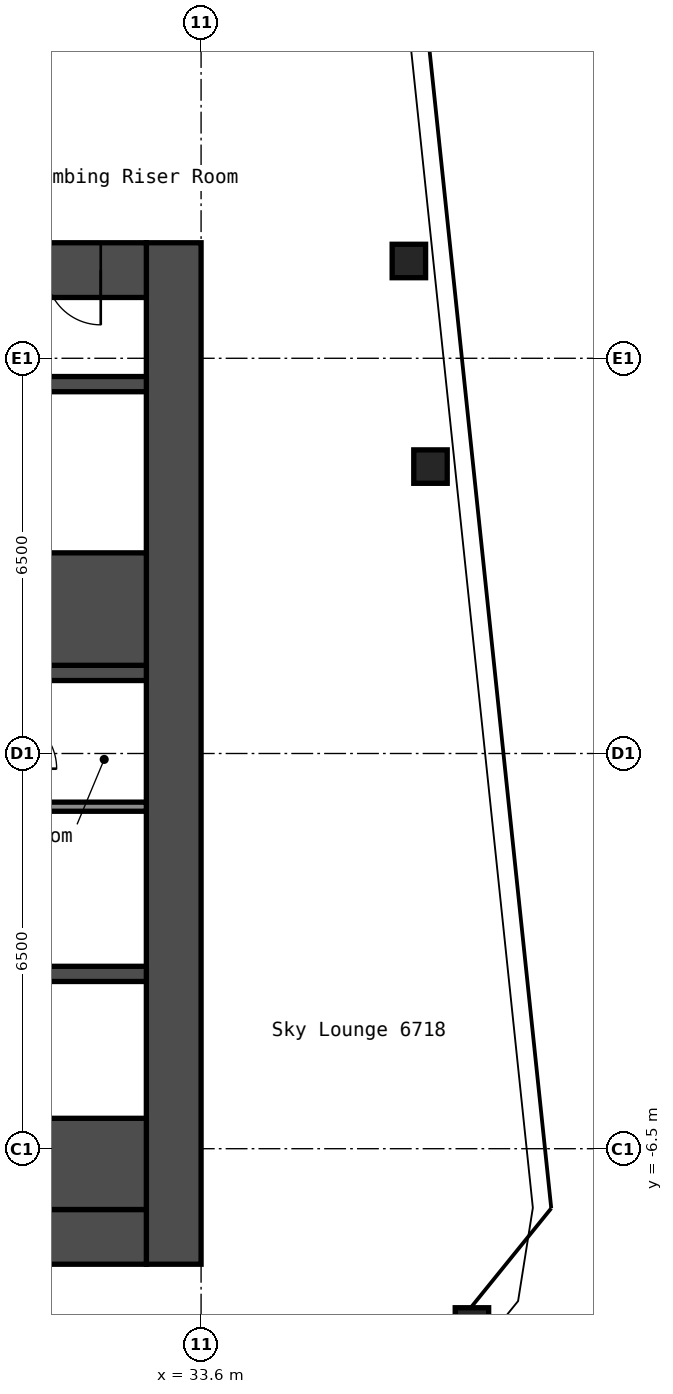
"""IFC4 building model, lengths in metres.
Left out: names, types, materials, properties, quantities, classifications, styles, units other than length and angle.
Written with IfcOpenShell. Run it as: python <this file> out.ifc"""

import sys

from ifc_helpers import new_model, si_unit, direction, frame, frame_2d, origin, origin_2d, place, context, subcontext, project, spatial, rectangle, hollow_rectangle, extrude, element, fill, save


model = new_model("IFC4")
c1 = context("Model", 3, precision=1e-05, world=origin(), true_north=direction((0.0, 1.0)))
c2 = subcontext(c1, "Body", "Model", "MODEL_VIEW")
j1 = project(units=[si_unit("LENGTHUNIT", "METRE"), si_unit("PLANEANGLEUNIT", "RADIAN")], contexts=[c1])
p1 = place(None, origin())
s1 = spatial("IfcSite", under=j1, at=p1, CompositionType="ELEMENT")
p2 = place(p1, origin())
s2 = spatial("IfcBuilding", under=s1, at=p2, CompositionType="ELEMENT")
p3 = place(p2, frame((0.0, 0.0, 239.0)))
s3 = spatial("IfcBuildingStorey", under=s2, at=p3, CompositionType="ELEMENT", Elevation=239.0)
for number, where, z_axis, x_axis in (
    (1, (38.054, -9.39, 0.0), (0.0, 0.0, 1.0), (1.0, 0.0, 0.0)),
    (2, (37.373, 4.719, 0.0), (0.0, 0.0, 1.0), (1.0, 0.0, 0.0)),
    (3, (37.017, 8.1, 0.0), (0.0, 0.0, 1.0), (1.0, 0.0, 0.0)),
):
    element("IfcColumn", number, at=place(p3, frame(where, z_axis=z_axis, x_axis=x_axis)), inside=s3, PredefinedType="COLUMN", context=c2, shape_type="SweptSolid", body=[
        extrude(hollow_rectangle(XDim=0.55, YDim=0.55, WallThickness=0.022, InnerFilletRadius=0.033, OuterFilletRadius=0.055, at=origin_2d()), origin(), (0.0, 0.0, 1.0), 2.75),
    ])
p4 = place(p3, frame((33.15, -8.4, 0.0), z_axis=(0.0, 0.0, 1.0), x_axis=(0.0, 1.0, 0.0)))
e4 = element("IfcWall", 4, at=p4, inside=s3, PredefinedType="SHEAR", context=c2, shape_type="SweptSolid", body=[
    extrude(rectangle(XDim=16.8, YDim=0.9, at=frame_2d((8.4, 0.0))), origin(), (0.0, 0.0, 1.0), 2.75),
])
p5 = place(p3, frame((17.7, 7.95, 0.0), z_axis=(0.0, 0.0, 1.0), x_axis=(1.0, 0.0, 0.0)))
e5 = element("IfcWall", 5, at=p5, inside=s3, PredefinedType="SHEAR", context=c2, shape_type="SweptSolid", body=[
    extrude(rectangle(XDim=15.0, YDim=0.9, at=frame_2d((7.5, 0.0))), origin(), (0.0, 0.0, 1.0), 2.75),
])
p6 = place(p5, frame((10.4, 0.0, 0.0)))
e6 = element("IfcOpeningElement", 6, at=p6, cuts=e5, PredefinedType="OPENING", context=c2, shape_type="SweptSolid", body=[
    extrude(rectangle(XDim=1.2, YDim=2.1, at=frame_2d((0.6, 1.05))), frame((0.0, 0.46, 0.0), z_axis=(0.0, -1.0, 0.0), x_axis=(1.0, 0.0, 0.0)), (0.0, 0.0, 1.0), 0.92),
])
p7 = place(p5, frame((13.35, 0.0, 0.0)))
e7 = element("IfcOpeningElement", 7, at=p7, cuts=e5, PredefinedType="OPENING", context=c2, shape_type="SweptSolid", body=[
    extrude(rectangle(XDim=0.9, YDim=2.1, at=frame_2d((0.45, 1.05))), frame((0.0, 0.46, 0.0), z_axis=(0.0, -1.0, 0.0), x_axis=(1.0, 0.0, 0.0)), (0.0, 0.0, 1.0), 0.92),
])
p8 = place(p3, frame((17.7, -7.95, 0.0), z_axis=(0.0, 0.0, 1.0), x_axis=(1.0, 0.0, 0.0)))
e8 = element("IfcWall", 8, at=p8, inside=s3, PredefinedType="SHEAR", context=c2, shape_type="SweptSolid", body=[
    extrude(rectangle(XDim=15.0, YDim=0.9, at=frame_2d((7.5, 0.0))), origin(), (0.0, 0.0, 1.0), 2.75),
])
p9 = place(p8, frame((2.55, 0.0, 0.0)))
e9 = element("IfcOpeningElement", 9, at=p9, cuts=e8, PredefinedType="OPENING", context=c2, shape_type="SweptSolid", body=[
    extrude(rectangle(XDim=1.0, YDim=2.1, at=frame_2d((0.5, 1.05))), frame((0.0, 0.46, 0.0), z_axis=(0.0, -1.0, 0.0), x_axis=(1.0, 0.0, 0.0)), (0.0, 0.0, 1.0), 0.92),
])
p10 = place(p3, frame((27.65, 1.325, 0.0), z_axis=(0.0, 0.0, 1.0), x_axis=(1.0, 0.0, 0.0)))
e10 = element("IfcWall", 10, at=p10, inside=s3, PredefinedType="SHEAR", context=c2, shape_type="SweptSolid", body=[
    extrude(rectangle(XDim=5.05, YDim=0.25, at=frame_2d((2.525, 0.0))), origin(), (0.0, 0.0, 1.0), 2.75),
])
p11 = place(p10, frame((0.55, 0.0, 0.0)))
e11 = element("IfcOpeningElement", 11, at=p11, cuts=e10, PredefinedType="OPENING", context=c2, shape_type="SweptSolid", body=[
    extrude(rectangle(XDim=1.2, YDim=2.1, at=frame_2d((0.6, 1.05))), frame((0.0, 0.135, 0.0), z_axis=(0.0, -1.0, 0.0), x_axis=(1.0, 0.0, 0.0)), (0.0, 0.0, 1.0), 0.27),
])
p12 = place(p3, frame((30.3, 2.375, 0.0), z_axis=(0.0, 0.0, 1.0), x_axis=(1.0, 0.0, 0.0)))
e12 = element("IfcWall", 12, at=p12, inside=s3, PredefinedType="SHEAR", context=c2, shape_type="SweptSolid", body=[
    extrude(rectangle(XDim=2.4, YDim=1.85, at=frame_2d((1.2, 0.0))), origin(), (0.0, 0.0, 1.0), 2.75),
])
p13 = place(p3, frame((30.3, 6.075, 0.0), z_axis=(0.0, 0.0, 1.0), x_axis=(1.0, 0.0, 0.0)))
e13 = element("IfcWall", 13, at=p13, inside=s3, PredefinedType="SHEAR", context=c2, shape_type="SweptSolid", body=[
    extrude(rectangle(XDim=2.4, YDim=0.25, at=frame_2d((1.2, 0.0))), origin(), (0.0, 0.0, 1.0), 2.75),
])
p14 = place(p3, frame((28.15, -3.625, 0.0), z_axis=(0.0, 0.0, 1.0), x_axis=(1.0, 0.0, 0.0)))
e14 = element("IfcWall", 14, at=p14, inside=s3, PredefinedType="SHEAR", context=c2, shape_type="SweptSolid", body=[
    extrude(rectangle(XDim=4.55, YDim=0.25, at=frame_2d((2.275, 0.0))), origin(), (0.0, 0.0, 1.0), 2.75),
])
p15 = place(p3, frame((28.15, -6.75, 0.0), z_axis=(0.0, 0.0, 1.0), x_axis=(1.0, 0.0, 0.0)))
e15 = element("IfcWall", 15, at=p15, inside=s3, PredefinedType="SHEAR", context=c2, shape_type="SweptSolid", body=[
    extrude(rectangle(XDim=4.55, YDim=1.5, at=frame_2d((2.275, 0.0))), origin(), (0.0, 0.0, 1.0), 2.75),
])
p16 = place(p3, frame((30.4, -0.875, 0.0), z_axis=(0.0, 0.0, 1.0), x_axis=(1.0, 0.0, 0.0)))
e16 = element("IfcWall", 16, at=p16, inside=s3, PredefinedType="PARTITIONING", context=c2, shape_type="SweptSolid", body=[
    extrude(rectangle(XDim=2.3, YDim=0.15, at=frame_2d((1.15, 0.0))), origin(), (0.0, 0.0, 1.0), 2.75),
])
p17 = place(p3, frame((16.048, 10.533, 0.0), z_axis=(0.0, 0.0, 1.0), x_axis=(0.994522460242, 0.104523088709, 0.0)))
e17 = element("IfcWall", 17, at=p17, inside=s3, PredefinedType="PARTITIONING", context=c2, shape_type="SweptSolid", body=[
    extrude(rectangle(XDim=21.3, YDim=0.2, at=frame_2d((10.65, 0.0))), origin(), (0.0, 0.0, 1.0), 2.75),
])
p18 = place(p17, frame((2.0, 0.0, 0.0)))
e18 = element("IfcOpeningElement", 18, at=p18, cuts=e17, PredefinedType="OPENING", context=c2, shape_type="SweptSolid", body=[
    extrude(rectangle(XDim=1.0, YDim=2.1, at=frame_2d((0.5, 1.05))), frame((0.0, 0.11, 0.0), z_axis=(0.0, -1.0, 0.0), x_axis=(1.0, 0.0, 0.0)), (0.0, 0.0, 1.0), 0.22),
])
p19 = place(p17, frame((13.8, 0.0, 0.0)))
e19 = element("IfcOpeningElement", 19, at=p19, cuts=e17, PredefinedType="OPENING", context=c2, shape_type="SweptSolid", body=[
    extrude(rectangle(XDim=1.0, YDim=2.1, at=frame_2d((0.5, 1.05))), frame((0.0, 0.11, 0.0), z_axis=(0.0, -1.0, 0.0), x_axis=(1.0, 0.0, 0.0)), (0.0, 0.0, 1.0), 0.22),
])
p20 = place(p17, frame((18.45, 0.0, 0.0)))
e20 = element("IfcOpeningElement", 20, at=p20, cuts=e17, PredefinedType="OPENING", context=c2, shape_type="SweptSolid", body=[
    extrude(rectangle(XDim=0.9, YDim=2.1, at=frame_2d((0.45, 1.05))), frame((0.0, 0.11, 0.0), z_axis=(0.0, -1.0, 0.0), x_axis=(1.0, 0.0, 0.0)), (0.0, 0.0, 1.0), 0.22),
])
p21 = place(p7, origin())
e21 = element("IfcDoor", 21, at=p21, inside=s3, OperationType="SINGLE_SWING_RIGHT", PredefinedType="DOOR", context=c2, shape_type="SweptSolid", body=[
    extrude(rectangle(XDim=0.9, YDim=2.1, at=frame_2d((0.45, 1.05))), frame((0.0, 0.025, 0.0), z_axis=(0.0, -1.0, 0.0), x_axis=(1.0, 0.0, 0.0)), (0.0, 0.0, 1.0), 0.05),
])
fill(e7, e21)
save(model, sys.argv[1])
